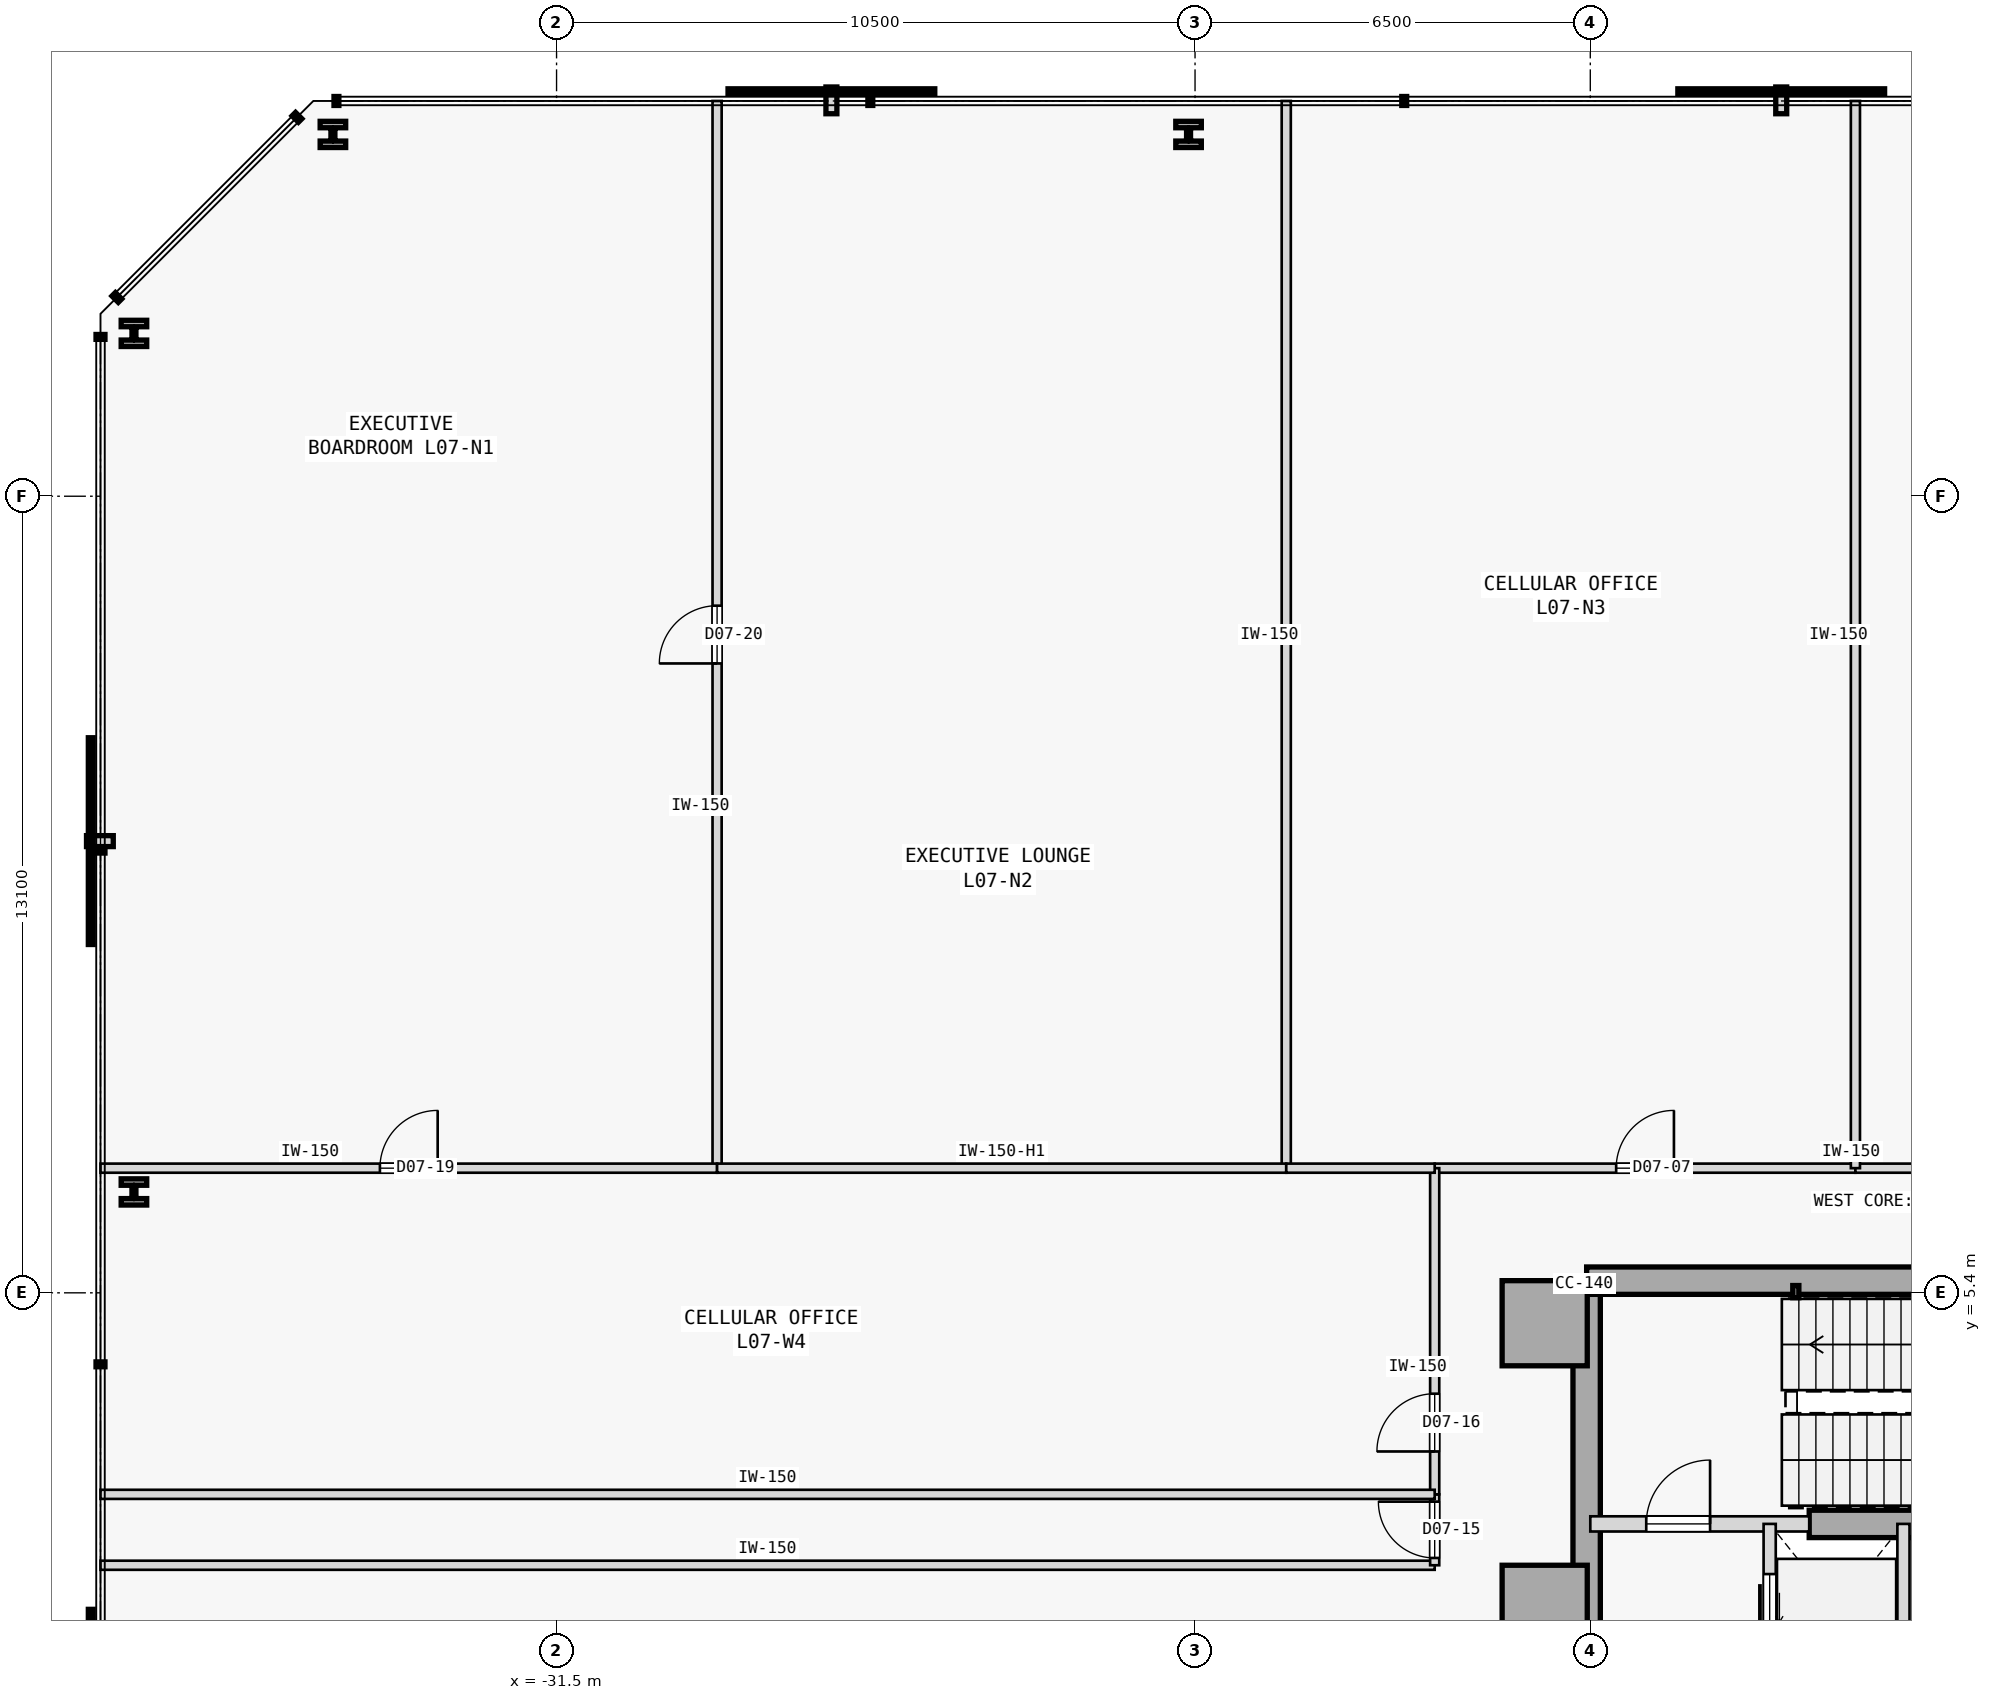
"""IFC4 building model, lengths in metres.
Left out: names, types, materials, properties, quantities, classifications, styles, units other than length and angle.
Written with IfcOpenShell. Run it as: python <this file> out.ifc"""

import sys

from ifc_helpers import new_model, si_unit, direction, frame, frame_2d, origin, origin_2d, place, context, subcontext, project, spatial, rectangle, hollow_rectangle, i_section, extrude, element, fill, save


model = new_model("IFC4")
c1 = context("Model", 3, precision=1e-05, world=origin(), true_north=direction((0.0, 1.0)))
c2 = subcontext(c1, "Body", "Model", "MODEL_VIEW")
j1 = project(units=[si_unit("LENGTHUNIT", "METRE"), si_unit("PLANEANGLEUNIT", "RADIAN")], contexts=[c1])
p1 = place(None, origin())
s1 = spatial("IfcSite", under=j1, at=p1, CompositionType="ELEMENT")
p2 = place(p1, origin())
s2 = spatial("IfcBuilding", under=s1, at=p2, CompositionType="ELEMENT")
p3 = place(p2, frame((0.0, 0.0, 33.2)))
s3 = spatial("IfcBuildingStorey", under=s2, at=p3, CompositionType="ELEMENT", Elevation=33.2)
for number, where, z_axis, x_axis in (
    (1, (-15.25, 4.9, 0.0), (0.0, 0.0, 1.0), (1.0, 0.0, 0.0)),
    (2, (-15.25, 0.22, 0.0), (0.0, 0.0, 1.0), (1.0, 0.0, 0.0)),
):
    element("IfcColumn", number, at=place(p3, frame(where, z_axis=z_axis, x_axis=x_axis)), inside=s3, PredefinedType="COLUMN", context=c2, shape_type="SweptSolid", body=[
        extrude(rectangle(XDim=1.4, YDim=1.4, at=origin_2d()), origin(), (0.0, 0.0, 1.0), 3.8),
    ])
p4 = place(p3, frame((-14.56, 5.6, 0.0), z_axis=(0.0, 0.0, 1.0), x_axis=(1.0, 0.0, 0.0)))
e3 = element("IfcWall", 3, at=p4, inside=s3, PredefinedType="SHEAR", context=c2, shape_type="SweptSolid", body=[
    extrude(rectangle(XDim=11.41, YDim=0.45, at=frame_2d((5.705, 0.0))), origin(), (0.0, 0.0, 1.0), 3.575),
])
p5 = place(p3, frame((-14.56, -5.375, 0.0), z_axis=(0.0, 0.0, 1.0), x_axis=(0.0, 1.0, 0.0)))
e4 = element("IfcWall", 4, at=p5, inside=s3, PredefinedType="SHEAR", context=c2, shape_type="SweptSolid", body=[
    extrude(rectangle(XDim=10.75, YDim=0.45, at=frame_2d((5.375, 0.0))), origin(), (0.0, 0.0, 1.0), 3.575),
])
p6 = place(p3, frame((-10.9, 1.6, 0.0), z_axis=(0.0, 0.0, 1.0), x_axis=(1.0, 0.0, 0.0)))
e5 = element("IfcWall", 5, at=p6, inside=s3, PredefinedType="SHEAR", context=c2, shape_type="SweptSolid", body=[
    extrude(rectangle(XDim=5.15, YDim=0.45, at=frame_2d((2.575, 0.0))), origin(), (0.0, 0.0, 1.0), 3.575),
])
p7 = place(p3, frame((-11.12, 5.42, 0.0), z_axis=(0.0, 0.0, 1.0), x_axis=(1.0, 0.0, 0.0)))
e6 = element("IfcColumn", 6, at=p7, inside=s3, PredefinedType="COLUMN", context=c2, shape_type="SweptSolid", body=[
    extrude(hollow_rectangle(XDim=0.1, YDim=0.2, WallThickness=0.008, at=origin_2d()), origin(), (0.0, 0.0, 1.0), 3.8),
])
for number, where, z_axis, x_axis in (
    (7, (-21.107, 24.45, 0.0), (0.0, 0.0, 1.0), (1.0, 0.0, 0.0)),
    (8, (-35.178, 24.45, 0.0), (0.0, 0.0, 1.0), (1.0, 0.0, 0.0)),
    (9, (-38.45, 21.178, 0.0), (0.0, 0.0, 1.0), (1.0, 0.0, 0.0)),
    (10, (-38.45, 7.059, 0.0), (0.0, 0.0, 1.0), (1.0, 0.0, 0.0)),
):
    element("IfcColumn", number, at=place(p3, frame(where, z_axis=z_axis, x_axis=x_axis)), inside=s3, PredefinedType="COLUMN", context=c2, shape_type="SweptSolid", body=[
        extrude(i_section(OverallWidth=0.42, OverallDepth=0.431, WebThickness=0.065, FlangeThickness=0.106, FilletRadius=0.015, at=origin_2d()), origin(), (0.0, 0.0, 1.0), 3.8),
    ])
p8 = place(p3, frame((-14.5, 1.6, 0.0), z_axis=(0.0, 0.0, 1.0), x_axis=(1.0, 0.0, 0.0)))
e11 = element("IfcWall", 11, at=p8, inside=s3, PredefinedType="STANDARD", context=c2, shape_type="SweptSolid", body=[
    extrude(rectangle(XDim=3.6, YDim=0.25, at=frame_2d((1.8, 0.0))), origin(), (0.0, 0.0, 1.0), 3.575),
])
p9 = place(p8, frame((0.92, 0.0, 0.0)))
e12 = element("IfcOpeningElement", 12, at=p9, cuts=e11, PredefinedType="OPENING", context=c2, shape_type="SweptSolid", body=[
    extrude(rectangle(XDim=1.05, YDim=2.15, at=frame_2d((0.525, 1.075))), frame((0.0, 0.135, 0.0), z_axis=(0.0, -1.0, 0.0), x_axis=(1.0, 0.0, 0.0)), (0.0, 0.0, 1.0), 0.27),
])
p10 = place(p3, frame((-11.55, -1.15, 0.0), z_axis=(0.0, 0.0, 1.0), x_axis=(0.0, 1.0, 0.0)))
e13 = element("IfcWall", 13, at=p10, inside=s3, PredefinedType="STANDARD", context=c2, shape_type="SweptSolid", body=[
    extrude(rectangle(XDim=2.75, YDim=0.2, at=frame_2d((1.375, 0.0))), origin(), (0.0, 0.0, 1.0), 3.575),
])
p11 = place(p10, frame((0.825, 0.0, 0.0)))
e14 = element("IfcOpeningElement", 14, at=p11, cuts=e13, PredefinedType="OPENING", context=c2, shape_type="SweptSolid", body=[
    extrude(rectangle(XDim=1.1, YDim=2.15, at=frame_2d((0.55, 1.075))), frame((0.0, 0.11, 0.0), z_axis=(0.0, -1.0, 0.0), x_axis=(1.0, 0.0, 0.0)), (0.0, 0.0, 1.0), 0.22),
])
p12 = place(p3, frame((-9.35, -1.15, 0.0), z_axis=(0.0, 0.0, 1.0), x_axis=(0.0, 1.0, 0.0)))
e15 = element("IfcWall", 15, at=p12, inside=s3, PredefinedType="STANDARD", context=c2, shape_type="SweptSolid", body=[
    extrude(rectangle(XDim=2.75, YDim=0.2, at=frame_2d((1.375, 0.0))), origin(), (0.0, 0.0, 1.0), 3.575),
])
p13 = place(p3, frame((-17.059, 7.45, 0.0), z_axis=(0.0, 0.0, 1.0), x_axis=(1.0, 0.0, 0.0)))
e16 = element("IfcWall", 16, at=p13, inside=s3, PredefinedType="PARTITIONING", context=c2, shape_type="SweptSolid", body=[
    extrude(rectangle(XDim=6.919, YDim=0.15, at=frame_2d((3.459, 0.0))), origin(), (0.0, 0.0, 1.0), 3.575),
])
p14 = place(p13, frame((2.985, 0.0, 0.0)))
e17 = element("IfcOpeningElement", 17, at=p14, cuts=e16, PredefinedType="OPENING", context=c2, shape_type="SweptSolid", body=[
    extrude(rectangle(XDim=0.95, YDim=2.15, at=frame_2d((0.475, 1.075))), frame((0.0, 0.085, 0.0), z_axis=(0.0, -1.0, 0.0), x_axis=(1.0, 0.0, 0.0)), (0.0, 0.0, 1.0), 0.17),
])
p15 = place(p3, frame((-10.14, 7.45, 0.0), z_axis=(0.0, 0.0, 1.0), x_axis=(1.0, 0.0, 0.0)))
e18 = element("IfcWall", 18, at=p15, inside=s3, PredefinedType="PARTITIONING", context=c2, shape_type="SweptSolid", body=[
    extrude(rectangle(XDim=9.22, YDim=0.15, at=frame_2d((4.61, 0.0))), origin(), (0.0, 0.0, 1.0), 3.575),
])
p16 = place(p3, frame((-39.0, 0.92, 0.0), z_axis=(0.0, 0.0, 1.0), x_axis=(1.0, 0.0, 0.0)))
e19 = element("IfcWall", 19, at=p16, inside=s3, PredefinedType="PARTITIONING", context=c2, shape_type="SweptSolid", body=[
    extrude(rectangle(XDim=21.941, YDim=0.15, at=frame_2d((10.97, 0.0))), origin(), (0.0, 0.0, 1.0), 3.575),
])
p17 = place(p3, frame((-17.059, 0.92, 0.0), z_axis=(0.0, 0.0, 1.0), x_axis=(0.0, 1.0, 0.0)))
e20 = element("IfcWall", 20, at=p17, inside=s3, PredefinedType="PARTITIONING", context=c2, shape_type="SweptSolid", body=[
    extrude(rectangle(XDim=1.166, YDim=0.15, at=frame_2d((0.583, 0.0))), origin(), (0.0, 0.0, 1.0), 3.575),
])
p18 = place(p17, frame((0.12, 0.0, 0.0)))
e21 = element("IfcOpeningElement", 21, at=p18, cuts=e20, PredefinedType="OPENING", context=c2, shape_type="SweptSolid", body=[
    extrude(rectangle(XDim=0.926, YDim=2.15, at=frame_2d((0.463, 1.075))), frame((0.0, 0.085, 0.0), z_axis=(0.0, -1.0, 0.0), x_axis=(1.0, 0.0, 0.0)), (0.0, 0.0, 1.0), 0.17),
])
p19 = place(p3, frame((-17.059, 2.086, 0.0), z_axis=(0.0, 0.0, 1.0), x_axis=(0.0, 1.0, 0.0)))
e22 = element("IfcWall", 22, at=p19, inside=s3, PredefinedType="PARTITIONING", context=c2, shape_type="SweptSolid", body=[
    extrude(rectangle(XDim=5.364, YDim=0.15, at=frame_2d((2.682, 0.0))), origin(), (0.0, 0.0, 1.0), 3.575),
])
p20 = place(p19, frame((0.705, 0.0, 0.0)))
e23 = element("IfcOpeningElement", 23, at=p20, cuts=e22, PredefinedType="OPENING", context=c2, shape_type="SweptSolid", body=[
    extrude(rectangle(XDim=0.95, YDim=2.15, at=frame_2d((0.475, 1.075))), frame((0.0, 0.085, 0.0), z_axis=(0.0, -1.0, 0.0), x_axis=(1.0, 0.0, 0.0)), (0.0, 0.0, 1.0), 0.17),
])
p21 = place(p3, frame((-28.86, 7.45, 0.0), z_axis=(0.0, 0.0, 1.0), x_axis=(0.0, 1.0, 0.0)))
e24 = element("IfcWall", 24, at=p21, inside=s3, PredefinedType="PARTITIONING", context=c2, shape_type="SweptSolid", body=[
    extrude(rectangle(XDim=17.55, YDim=0.15, at=frame_2d((8.775, 0.0))), origin(), (0.0, 0.0, 1.0), 3.575),
])
p22 = place(p21, frame((8.3, 0.0, 0.0)))
e25 = element("IfcOpeningElement", 25, at=p22, cuts=e24, PredefinedType="OPENING", context=c2, shape_type="SweptSolid", body=[
    extrude(rectangle(XDim=0.95, YDim=2.15, at=frame_2d((0.475, 1.075))), frame((0.0, 0.085, 0.0), z_axis=(0.0, -1.0, 0.0), x_axis=(1.0, 0.0, 0.0)), (0.0, 0.0, 1.0), 0.17),
])
p23 = place(p3, frame((-39.0, 7.45, 0.0), z_axis=(0.0, 0.0, 1.0), x_axis=(1.0, 0.0, 0.0)))
e26 = element("IfcWall", 26, at=p23, inside=s3, PredefinedType="PARTITIONING", context=c2, shape_type="SweptSolid", body=[
    extrude(rectangle(XDim=10.14, YDim=0.15, at=frame_2d((5.07, 0.0))), origin(), (0.0, 0.0, 1.0), 3.575),
])
p24 = place(p23, frame((4.595, 0.0, 0.0)))
e27 = element("IfcOpeningElement", 27, at=p24, cuts=e26, PredefinedType="OPENING", context=c2, shape_type="SweptSolid", body=[
    extrude(rectangle(XDim=0.95, YDim=2.15, at=frame_2d((0.475, 1.075))), frame((0.0, 0.085, 0.0), z_axis=(0.0, -1.0, 0.0), x_axis=(1.0, 0.0, 0.0)), (0.0, 0.0, 1.0), 0.17),
])
p25 = place(p3, frame((-19.5, 7.45, 0.0), z_axis=(0.0, 0.0, 1.0), x_axis=(0.0, 1.0, 0.0)))
e28 = element("IfcWall", 28, at=p25, inside=s3, PredefinedType="PARTITIONING", context=c2, shape_type="SweptSolid", body=[
    extrude(rectangle(XDim=17.55, YDim=0.15, at=frame_2d((8.775, 0.0))), origin(), (0.0, 0.0, 1.0), 3.575),
])
p26 = place(p3, frame((-28.86, 7.45, 0.0), z_axis=(0.0, 0.0, 1.0), x_axis=(1.0, 0.0, 0.0)))
e29 = element("IfcWall", 29, at=p26, inside=s3, PredefinedType="PARTITIONING", context=c2, shape_type="SweptSolid", body=[
    extrude(rectangle(XDim=9.36, YDim=0.15, at=frame_2d((4.68, 0.0))), origin(), (0.0, 0.0, 1.0), 3.125),
])
p27 = place(p3, frame((-10.14, 7.45, 0.0), z_axis=(0.0, 0.0, 1.0), x_axis=(0.0, 1.0, 0.0)))
e30 = element("IfcWall", 30, at=p27, inside=s3, PredefinedType="PARTITIONING", context=c2, shape_type="SweptSolid", body=[
    extrude(rectangle(XDim=17.55, YDim=0.15, at=frame_2d((8.775, 0.0))), origin(), (0.0, 0.0, 1.0), 3.575),
])
p28 = place(p3, frame((-19.5, 7.45, 0.0), z_axis=(0.0, 0.0, 1.0), x_axis=(1.0, 0.0, 0.0)))
e31 = element("IfcWall", 31, at=p28, inside=s3, PredefinedType="PARTITIONING", context=c2, shape_type="SweptSolid", body=[
    extrude(rectangle(XDim=2.441, YDim=0.15, at=frame_2d((1.22, 0.0))), origin(), (0.0, 0.0, 1.0), 3.575),
])
p29 = place(p3, frame((-39.0, 2.086, 0.0), z_axis=(0.0, 0.0, 1.0), x_axis=(1.0, 0.0, 0.0)))
e32 = element("IfcWall", 32, at=p29, inside=s3, PredefinedType="PARTITIONING", context=c2, shape_type="SweptSolid", body=[
    extrude(rectangle(XDim=21.941, YDim=0.15, at=frame_2d((10.97, 0.0))), origin(), (0.0, 0.0, 1.0), 3.575),
])
p30 = place(p9, origin())
e33 = element("IfcDoor", 33, at=p30, inside=s3, OperationType="SINGLE_SWING_RIGHT", PredefinedType="DOOR", context=c2, shape_type="SweptSolid", body=[
    extrude(rectangle(XDim=1.05, YDim=2.15, at=frame_2d((0.525, 1.075))), frame((0.0, 0.025, 0.0), z_axis=(0.0, -1.0, 0.0), x_axis=(1.0, 0.0, 0.0)), (0.0, 0.0, 1.0), 0.05),
])
fill(e12, e33)
p31 = place(p11, origin())
e34 = element("IfcDoor", 34, at=p31, inside=s3, OperationType="SLIDING_TO_RIGHT", PredefinedType="DOOR", context=c2, shape_type="SweptSolid", body=[
    extrude(rectangle(XDim=1.1, YDim=2.15, at=frame_2d((0.55, 1.075))), frame((0.0, 0.025, 0.0), z_axis=(0.0, -1.0, 0.0), x_axis=(1.0, 0.0, 0.0)), (0.0, 0.0, 1.0), 0.05),
])
fill(e14, e34)
p32 = place(p14, origin())
e35 = element("IfcDoor", 35, at=p32, inside=s3, OperationType="SINGLE_SWING_RIGHT", PredefinedType="DOOR", context=c2, shape_type="SweptSolid", body=[
    extrude(rectangle(XDim=0.95, YDim=2.15, at=frame_2d((0.475, 1.075))), frame((0.0, 0.025, 0.0), z_axis=(0.0, -1.0, 0.0), x_axis=(1.0, 0.0, 0.0)), (0.0, 0.0, 1.0), 0.05),
])
fill(e17, e35)
p33 = place(p18, origin())
e36 = element("IfcDoor", 36, at=p33, inside=s3, OperationType="SINGLE_SWING_RIGHT", PredefinedType="DOOR", context=c2, shape_type="SweptSolid", body=[
    extrude(rectangle(XDim=0.926, YDim=2.15, at=frame_2d((0.463, 1.075))), frame((0.0, 0.025, 0.0), z_axis=(0.0, -1.0, 0.0), x_axis=(1.0, 0.0, 0.0)), (0.0, 0.0, 1.0), 0.05),
])
fill(e21, e36)
p34 = place(p20, origin())
e37 = element("IfcDoor", 37, at=p34, inside=s3, OperationType="SINGLE_SWING_LEFT", PredefinedType="DOOR", context=c2, shape_type="SweptSolid", body=[
    extrude(rectangle(XDim=0.95, YDim=2.15, at=frame_2d((0.475, 1.075))), frame((0.0, 0.025, 0.0), z_axis=(0.0, -1.0, 0.0), x_axis=(1.0, 0.0, 0.0)), (0.0, 0.0, 1.0), 0.05),
])
fill(e23, e37)
p35 = place(p24, origin())
e38 = element("IfcDoor", 38, at=p35, inside=s3, OperationType="SINGLE_SWING_RIGHT", PredefinedType="DOOR", context=c2, shape_type="SweptSolid", body=[
    extrude(rectangle(XDim=0.95, YDim=2.15, at=frame_2d((0.475, 1.075))), frame((0.0, 0.025, 0.0), z_axis=(0.0, -1.0, 0.0), x_axis=(1.0, 0.0, 0.0)), (0.0, 0.0, 1.0), 0.05),
])
fill(e27, e38)
p36 = place(p22, origin())
e39 = element("IfcDoor", 39, at=p36, inside=s3, OperationType="SINGLE_SWING_LEFT", PredefinedType="DOOR", context=c2, shape_type="SweptSolid", body=[
    extrude(rectangle(XDim=0.95, YDim=2.15, at=frame_2d((0.475, 1.075))), frame((0.0, 0.025, 0.0), z_axis=(0.0, -1.0, 0.0), x_axis=(1.0, 0.0, 0.0)), (0.0, 0.0, 1.0), 0.05),
])
fill(e25, e39)
save(model, sys.argv[1])
